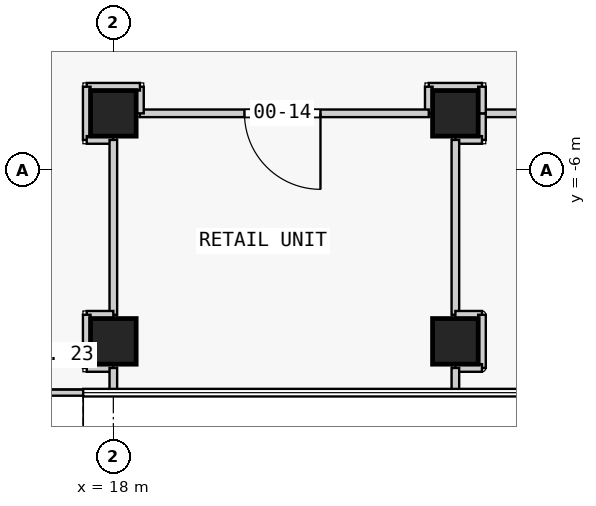
"""IFC4 building model, lengths in metres.
Left out: names, types, materials, properties, quantities, classifications, styles, units other than length and angle.
Written with IfcOpenShell. Run it as: python <this file> out.ifc"""

import sys

from ifc_helpers import new_model, si_unit, direction, frame, frame_2d, origin, origin_2d, place, context, subcontext, project, spatial, rectangle, extrude, element, fill, save


model = new_model("IFC4")
c1 = context("Model", 3, precision=1e-05, world=origin(), true_north=direction((0.0, 1.0)))
c2 = subcontext(c1, "Body", "Model", "MODEL_VIEW")
j1 = project(units=[si_unit("LENGTHUNIT", "METRE"), si_unit("PLANEANGLEUNIT", "RADIAN")], contexts=[c1])
p1 = place(None, origin())
s1 = spatial("IfcSite", under=j1, at=p1, CompositionType="ELEMENT")
p2 = place(p1, origin())
s2 = spatial("IfcBuilding", under=s1, at=p2, CompositionType="ELEMENT")
p3 = place(p2, origin())
s3 = spatial("IfcBuildingStorey", under=s2, at=p3, CompositionType="ELEMENT", Elevation=0.0)
for number, where, z_axis, x_axis in (
    (1, (18.0, -10.5, 0.0), (0.0, 0.0, 1.0), (1.0, 0.0, 0.0)),
    (2, (18.0, -4.5, 0.0), (0.0, 0.0, 1.0), (1.0, 0.0, 0.0)),
    (3, (27.0, -10.5, 0.0), (0.0, 0.0, 1.0), (1.0, 0.0, 0.0)),
    (4, (27.0, -4.5, 0.0), (0.0, 0.0, 1.0), (1.0, 0.0, 0.0)),
):
    element("IfcColumn", number, at=place(p3, frame(where, z_axis=z_axis, x_axis=x_axis)), inside=s3, PredefinedType="COLUMN", context=c2, shape_type="SweptSolid", body=[
        extrude(rectangle(XDim=1.2, YDim=1.2, at=origin_2d()), origin(), (0.0, 0.0, 1.0), 8.0),
    ])
p4 = place(p3, frame((17.207, -11.85, 0.0), z_axis=(0.0, 0.0, 1.0), x_axis=(-1.0, 0.0, 0.0)))
e5 = element("IfcWall", 5, at=p4, inside=s3, PredefinedType="STANDARD", context=c2, shape_type="SweptSolid", body=[
    extrude(rectangle(XDim=8.907, YDim=0.16, at=frame_2d((4.453, 0.0))), origin(), (0.0, 0.0, 1.0), 7.65),
])
p5 = place(p4, frame((2.053, 0.0, 0.0)))
e6 = element("IfcOpeningElement", 6, at=p5, cuts=e5, PredefinedType="OPENING", context=c2, shape_type="SweptSolid", body=[
    extrude(rectangle(XDim=2.4, YDim=2.7, at=frame_2d((1.2, 1.35))), frame((0.0, 0.09, 0.0), z_axis=(0.0, -1.0, 0.0), x_axis=(1.0, 0.0, 0.0)), (0.0, 0.0, 1.0), 0.18),
])
p6 = place(p4, frame((4.453, 0.0, 0.0)))
e7 = element("IfcOpeningElement", 7, at=p6, cuts=e5, PredefinedType="OPENING", context=c2, shape_type="SweptSolid", body=[
    extrude(rectangle(XDim=2.4, YDim=2.7, at=frame_2d((1.2, 1.35))), frame((0.0, 0.09, 0.0), z_axis=(0.0, -1.0, 0.0), x_axis=(1.0, 0.0, 0.0)), (0.0, 0.0, 1.0), 0.18),
])
p7 = place(p3, frame((27.7, -3.8, 0.0), z_axis=(0.0, 0.0, 1.0), x_axis=(-1.0, 0.0, 0.0)))
e8 = element("IfcWall", 8, at=p7, inside=s3, PredefinedType="PARTITIONING", context=c2, shape_type="SweptSolid", body=[
    extrude(rectangle(XDim=1.4, YDim=0.2, at=frame_2d((0.7, 0.0))), origin(), (0.0, 0.0, 1.0), 6.95),
])
p8 = place(p3, frame((26.3, -3.8, 0.0), z_axis=(0.0, 0.0, 1.0), x_axis=(0.0, -1.0, 0.0)))
e9 = element("IfcWall", 9, at=p8, inside=s3, PredefinedType="PARTITIONING", context=c2, shape_type="SweptSolid", body=[
    extrude(rectangle(XDim=0.7, YDim=0.2, at=frame_2d((0.35, 0.0))), origin(), (0.0, 0.0, 1.0), 6.95),
])
p9 = place(p3, frame((26.3, -4.5, 0.0), z_axis=(0.0, 0.0, 1.0), x_axis=(-1.0, 0.0, 0.0)))
e10 = element("IfcWall", 10, at=p9, inside=s3, PredefinedType="PARTITIONING", context=c2, shape_type="SweptSolid", body=[
    extrude(rectangle(XDim=7.6, YDim=0.2, at=frame_2d((3.8, 0.0))), origin(), (0.0, 0.0, 1.0), 6.95),
])
p10 = place(p9, frame((2.85, 0.0, 0.0)))
e11 = element("IfcOpeningElement", 11, at=p10, cuts=e10, PredefinedType="OPENING", context=c2, shape_type="SweptSolid", body=[
    extrude(rectangle(XDim=2.0, YDim=2.4, at=frame_2d((1.0, 1.2))), frame((0.0, 0.11, 0.0), z_axis=(0.0, -1.0, 0.0), x_axis=(1.0, 0.0, 0.0)), (0.0, 0.0, 1.0), 0.22),
])
p11 = place(p3, frame((18.7, -4.5, 0.0), z_axis=(0.0, 0.0, 1.0), x_axis=(0.0, 1.0, 0.0)))
e12 = element("IfcWall", 12, at=p11, inside=s3, PredefinedType="PARTITIONING", context=c2, shape_type="SweptSolid", body=[
    extrude(rectangle(XDim=0.7, YDim=0.2, at=frame_2d((0.35, 0.0))), origin(), (0.0, 0.0, 1.0), 6.95),
])
p12 = place(p3, frame((18.7, -3.8, 0.0), z_axis=(0.0, 0.0, 1.0), x_axis=(-1.0, 0.0, 0.0)))
e13 = element("IfcWall", 13, at=p12, inside=s3, PredefinedType="PARTITIONING", context=c2, shape_type="SweptSolid", body=[
    extrude(rectangle(XDim=1.4, YDim=0.2, at=frame_2d((0.7, 0.0))), origin(), (0.0, 0.0, 1.0), 7.65),
])
p13 = place(p3, frame((17.3, -3.8, 0.0), z_axis=(0.0, 0.0, 1.0), x_axis=(0.0, -1.0, 0.0)))
e14 = element("IfcWall", 14, at=p13, inside=s3, PredefinedType="PARTITIONING", context=c2, shape_type="SweptSolid", body=[
    extrude(rectangle(XDim=1.4, YDim=0.2, at=frame_2d((0.7, 0.0))), origin(), (0.0, 0.0, 1.0), 6.95),
])
p14 = place(p3, frame((17.3, -5.2, 0.0), z_axis=(0.0, 0.0, 1.0), x_axis=(1.0, 0.0, 0.0)))
e15 = element("IfcWall", 15, at=p14, inside=s3, PredefinedType="PARTITIONING", context=c2, shape_type="SweptSolid", body=[
    extrude(rectangle(XDim=0.7, YDim=0.2, at=frame_2d((0.35, 0.0))), origin(), (0.0, 0.0, 1.0), 6.95),
])
p15 = place(p3, frame((18.0, -5.2, 0.0), z_axis=(0.0, 0.0, 1.0), x_axis=(0.0, -1.0, 0.0)))
e16 = element("IfcWall", 16, at=p15, inside=s3, PredefinedType="PARTITIONING", context=c2, shape_type="SweptSolid", body=[
    extrude(rectangle(XDim=4.6, YDim=0.2, at=frame_2d((2.3, 0.0))), origin(), (0.0, 0.0, 1.0), 6.95),
])
p16 = place(p3, frame((18.0, -9.8, 0.0), z_axis=(0.0, 0.0, 1.0), x_axis=(-1.0, 0.0, 0.0)))
e17 = element("IfcWall", 17, at=p16, inside=s3, PredefinedType="PARTITIONING", context=c2, shape_type="SweptSolid", body=[
    extrude(rectangle(XDim=0.7, YDim=0.2, at=frame_2d((0.35, 0.0))), origin(), (0.0, 0.0, 1.0), 6.95),
])
p17 = place(p3, frame((17.3, -9.8, 0.0), z_axis=(0.0, 0.0, 1.0), x_axis=(0.0, -1.0, 0.0)))
e18 = element("IfcWall", 18, at=p17, inside=s3, PredefinedType="PARTITIONING", context=c2, shape_type="SweptSolid", body=[
    extrude(rectangle(XDim=1.4, YDim=0.2, at=frame_2d((0.7, 0.0))), origin(), (0.0, 0.0, 1.0), 6.95),
])
p18 = place(p3, frame((17.3, -11.2, 0.0), z_axis=(0.0, 0.0, 1.0), x_axis=(1.0, 0.0, 0.0)))
e19 = element("IfcWall", 19, at=p18, inside=s3, PredefinedType="PARTITIONING", context=c2, shape_type="SweptSolid", body=[
    extrude(rectangle(XDim=0.7, YDim=0.2, at=frame_2d((0.35, 0.0))), origin(), (0.0, 0.0, 1.0), 7.65),
])
p19 = place(p3, frame((18.0, -11.2, 0.0), z_axis=(0.0, 0.0, 1.0), x_axis=(0.0, -1.0, 0.0)))
e20 = element("IfcWall", 20, at=p19, inside=s3, PredefinedType="PARTITIONING", context=c2, shape_type="SweptSolid", body=[
    extrude(rectangle(XDim=0.65, YDim=0.2, at=frame_2d((0.325, 0.0))), origin(), (0.0, 0.0, 1.0), 7.65),
])
p20 = place(p3, frame((35.3, -4.5, 0.0), z_axis=(0.0, 0.0, 1.0), x_axis=(-1.0, 0.0, 0.0)))
e21 = element("IfcWall", 21, at=p20, inside=s3, PredefinedType="PARTITIONING", context=c2, shape_type="SweptSolid", body=[
    extrude(rectangle(XDim=7.6, YDim=0.2, at=frame_2d((3.8, 0.0))), origin(), (0.0, 0.0, 1.0), 6.95),
])
p21 = place(p20, frame((2.85, 0.0, 0.0)))
e22 = element("IfcOpeningElement", 22, at=p21, cuts=e21, PredefinedType="OPENING", context=c2, shape_type="SweptSolid", body=[
    extrude(rectangle(XDim=2.0, YDim=2.4, at=frame_2d((1.0, 1.2))), frame((0.0, 0.11, 0.0), z_axis=(0.0, -1.0, 0.0), x_axis=(1.0, 0.0, 0.0)), (0.0, 0.0, 1.0), 0.22),
])
for number, where, z_axis, x_axis in (
    (23, (27.7, -4.5, 0.0), (0.0, 0.0, 1.0), (0.0, -1.0, 0.0)),
    (24, (27.7, -5.2, 0.0), (0.0, 0.0, 1.0), (-1.0, 0.0, 0.0)),
):
    element("IfcWall", number, at=place(p3, frame(where, z_axis=z_axis, x_axis=x_axis)), inside=s3, PredefinedType="PARTITIONING", context=c2, shape_type="SweptSolid", body=[
        extrude(rectangle(XDim=0.7, YDim=0.2, at=frame_2d((0.35, 0.0))), origin(), (0.0, 0.0, 1.0), 6.95),
    ])
p22 = place(p3, frame((27.0, -5.2, 0.0), z_axis=(0.0, 0.0, 1.0), x_axis=(0.0, -1.0, 0.0)))
e25 = element("IfcWall", 25, at=p22, inside=s3, PredefinedType="PARTITIONING", context=c2, shape_type="SweptSolid", body=[
    extrude(rectangle(XDim=4.6, YDim=0.2, at=frame_2d((2.3, 0.0))), origin(), (0.0, 0.0, 1.0), 6.95),
])
p23 = place(p3, frame((27.0, -9.8, 0.0), z_axis=(0.0, 0.0, 1.0), x_axis=(1.0, 0.0, 0.0)))
e26 = element("IfcWall", 26, at=p23, inside=s3, PredefinedType="PARTITIONING", context=c2, shape_type="SweptSolid", body=[
    extrude(rectangle(XDim=0.7, YDim=0.2, at=frame_2d((0.35, 0.0))), origin(), (0.0, 0.0, 1.0), 6.95),
])
p24 = place(p3, frame((27.7, -9.8, 0.0), z_axis=(0.0, 0.0, 1.0), x_axis=(0.0, -1.0, 0.0)))
e27 = element("IfcWall", 27, at=p24, inside=s3, PredefinedType="PARTITIONING", context=c2, shape_type="SweptSolid", body=[
    extrude(rectangle(XDim=1.4, YDim=0.2, at=frame_2d((0.7, 0.0))), origin(), (0.0, 0.0, 1.0), 6.95),
])
p25 = place(p3, frame((27.7, -11.2, 0.0), z_axis=(0.0, 0.0, 1.0), x_axis=(-1.0, 0.0, 0.0)))
e28 = element("IfcWall", 28, at=p25, inside=s3, PredefinedType="PARTITIONING", context=c2, shape_type="SweptSolid", body=[
    extrude(rectangle(XDim=0.7, YDim=0.2, at=frame_2d((0.35, 0.0))), origin(), (0.0, 0.0, 1.0), 7.65),
])
p26 = place(p3, frame((27.0, -11.2, 0.0), z_axis=(0.0, 0.0, 1.0), x_axis=(0.0, -1.0, 0.0)))
e29 = element("IfcWall", 29, at=p26, inside=s3, PredefinedType="PARTITIONING", context=c2, shape_type="SweptSolid", body=[
    extrude(rectangle(XDim=0.65, YDim=0.2, at=frame_2d((0.325, 0.0))), origin(), (0.0, 0.0, 1.0), 7.65),
])
p27 = place(p3, frame((27.7, -4.5, 0.0), z_axis=(0.0, 0.0, 1.0), x_axis=(0.0, 1.0, 0.0)))
e30 = element("IfcWall", 30, at=p27, inside=s3, PredefinedType="PARTITIONING", context=c2, shape_type="SweptSolid", body=[
    extrude(rectangle(XDim=0.7, YDim=0.2, at=frame_2d((0.35, 0.0))), origin(), (0.0, 0.0, 1.0), 6.95),
])
p28 = place(p10, origin())
e31 = element("IfcDoor", 31, at=p28, inside=s3, OperationType="SINGLE_SWING_LEFT", PredefinedType="DOOR", context=c2, shape_type="SweptSolid", body=[
    extrude(rectangle(XDim=2.0, YDim=2.4, at=frame_2d((1.0, 1.2))), frame((0.0, 0.025, 0.0), z_axis=(0.0, -1.0, 0.0), x_axis=(1.0, 0.0, 0.0)), (0.0, 0.0, 1.0), 0.05),
])
fill(e11, e31)
save(model, sys.argv[1])
